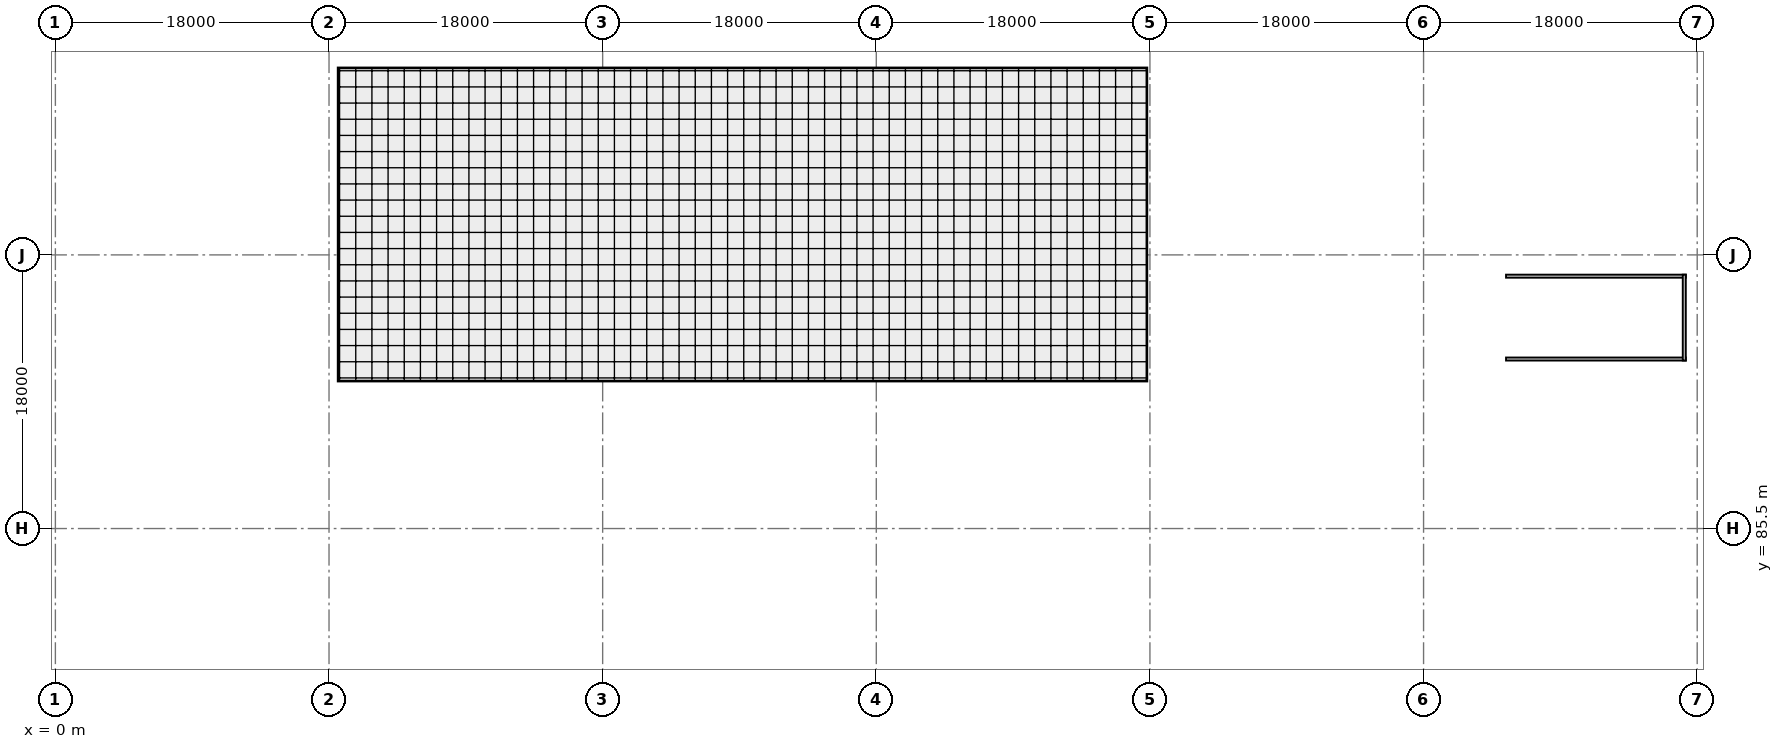
"""IFC4 building model, lengths in metres.
Left out: names, types, materials, properties, quantities, classifications, styles, units other than length and angle.
Written with IfcOpenShell. Run it as: python <this file> out.ifc"""

import sys

from ifc_helpers import new_model, si_unit, direction, frame, frame_2d, origin, origin_2d, place, context, subcontext, project, spatial, rectangle, extrude, element, save


model = new_model("IFC4")
c1 = context("Model", 3, precision=1e-05, world=origin(), true_north=direction((0.0, 1.0)))
c2 = subcontext(c1, "Body", "Model", "MODEL_VIEW")
j1 = project(units=[si_unit("LENGTHUNIT", "METRE"), si_unit("PLANEANGLEUNIT", "RADIAN")], contexts=[c1])
p1 = place(None, origin())
s1 = spatial("IfcSite", under=j1, at=p1, CompositionType="ELEMENT")
p2 = place(p1, origin())
s2 = spatial("IfcBuilding", under=s1, at=p2, CompositionType="ELEMENT")
p3 = place(p2, frame((0.0, 0.0, -5.4)))
s3 = spatial("IfcBuildingStorey", under=s2, at=p3, CompositionType="ELEMENT", Elevation=-5.4)
for number, where, z_axis, x_axis in (
    (1, (0.0, 76.5, 0.0), (0.0, 0.0, 1.0), (1.0, 0.0, 0.0)),
    (2, (0.0, 85.5, 0.0), (0.0, 0.0, 1.0), (1.0, 0.0, 0.0)),
    (3, (0.0, 94.5, 0.0), (0.0, 0.0, 1.0), (1.0, 0.0, 0.0)),
    (4, (0.0, 103.5, 0.0), (0.0, 0.0, 1.0), (1.0, 0.0, 0.0)),
):
    element("IfcColumn", number, at=place(p3, frame(where, z_axis=z_axis, x_axis=x_axis)), inside=s3, PredefinedType="COLUMN", context=c2, shape_type="SweptSolid", body=[
        extrude(rectangle(XDim=1.6, YDim=1.2, at=origin_2d()), origin(), (0.0, 0.0, 1.0), 5.4),
    ])
p4 = place(p3, frame((0.0, 117.0, 0.0), z_axis=(0.0, 0.0, 1.0), x_axis=(1.0, 0.0, 0.0)))
e5 = element("IfcColumn", 5, at=p4, inside=s3, PredefinedType="COLUMN", context=c2, shape_type="SweptSolid", body=[
    extrude(rectangle(XDim=1.0, YDim=0.9, at=origin_2d()), origin(), (0.0, 0.0, 1.0), 5.4),
])
p5 = place(p3, frame((18.0, 103.5, 0.0), z_axis=(0.0, 0.0, 1.0), x_axis=(1.0, 0.0, 0.0)))
e6 = element("IfcColumn", 6, at=p5, inside=s3, PredefinedType="COLUMN", context=c2, shape_type="SweptSolid", body=[
    extrude(rectangle(XDim=1.6, YDim=1.2, at=origin_2d()), origin(), (0.0, 0.0, 1.0), 5.4),
])
p6 = place(p3, frame((18.0, 117.0, 0.0), z_axis=(0.0, 0.0, 1.0), x_axis=(1.0, 0.0, 0.0)))
e7 = element("IfcColumn", 7, at=p6, inside=s3, PredefinedType="COLUMN", context=c2, shape_type="SweptSolid", body=[
    extrude(rectangle(XDim=1.0, YDim=0.9, at=origin_2d()), origin(), (0.0, 0.0, 1.0), 5.4),
])
p7 = place(p3, frame((36.0, 103.5, 0.0), z_axis=(0.0, 0.0, 1.0), x_axis=(1.0, 0.0, 0.0)))
e8 = element("IfcColumn", 8, at=p7, inside=s3, PredefinedType="COLUMN", context=c2, shape_type="SweptSolid", body=[
    extrude(rectangle(XDim=1.6, YDim=1.2, at=origin_2d()), origin(), (0.0, 0.0, 1.0), 5.4),
])
p8 = place(p3, frame((36.0, 117.0, 0.0), z_axis=(0.0, 0.0, 1.0), x_axis=(1.0, 0.0, 0.0)))
e9 = element("IfcColumn", 9, at=p8, inside=s3, PredefinedType="COLUMN", context=c2, shape_type="SweptSolid", body=[
    extrude(rectangle(XDim=1.0, YDim=0.9, at=origin_2d()), origin(), (0.0, 0.0, 1.0), 5.4),
])
p9 = place(p3, frame((54.0, 103.5, 0.0), z_axis=(0.0, 0.0, 1.0), x_axis=(1.0, 0.0, 0.0)))
e10 = element("IfcColumn", 10, at=p9, inside=s3, PredefinedType="COLUMN", context=c2, shape_type="SweptSolid", body=[
    extrude(rectangle(XDim=1.6, YDim=1.2, at=origin_2d()), origin(), (0.0, 0.0, 1.0), 5.4),
])
p10 = place(p3, frame((54.0, 117.0, 0.0), z_axis=(0.0, 0.0, 1.0), x_axis=(1.0, 0.0, 0.0)))
e11 = element("IfcColumn", 11, at=p10, inside=s3, PredefinedType="COLUMN", context=c2, shape_type="SweptSolid", body=[
    extrude(rectangle(XDim=1.0, YDim=0.9, at=origin_2d()), origin(), (0.0, 0.0, 1.0), 5.4),
])
p11 = place(p3, frame((72.0, 103.5, 0.0), z_axis=(0.0, 0.0, 1.0), x_axis=(1.0, 0.0, 0.0)))
e12 = element("IfcColumn", 12, at=p11, inside=s3, PredefinedType="COLUMN", context=c2, shape_type="SweptSolid", body=[
    extrude(rectangle(XDim=1.6, YDim=1.2, at=origin_2d()), origin(), (0.0, 0.0, 1.0), 5.4),
])
p12 = place(p3, frame((72.0, 117.0, 0.0), z_axis=(0.0, 0.0, 1.0), x_axis=(1.0, 0.0, 0.0)))
e13 = element("IfcColumn", 13, at=p12, inside=s3, PredefinedType="COLUMN", context=c2, shape_type="SweptSolid", body=[
    extrude(rectangle(XDim=1.0, YDim=0.9, at=origin_2d()), origin(), (0.0, 0.0, 1.0), 5.4),
])
p13 = place(p3, frame((90.0, 103.5, 0.0), z_axis=(0.0, 0.0, 1.0), x_axis=(1.0, 0.0, 0.0)))
e14 = element("IfcColumn", 14, at=p13, inside=s3, PredefinedType="COLUMN", context=c2, shape_type="SweptSolid", body=[
    extrude(rectangle(XDim=1.6, YDim=1.2, at=origin_2d()), origin(), (0.0, 0.0, 1.0), 5.4),
])
p14 = place(p3, frame((90.0, 117.0, 0.0), z_axis=(0.0, 0.0, 1.0), x_axis=(1.0, 0.0, 0.0)))
e15 = element("IfcColumn", 15, at=p14, inside=s3, PredefinedType="COLUMN", context=c2, shape_type="SweptSolid", body=[
    extrude(rectangle(XDim=1.0, YDim=0.9, at=origin_2d()), origin(), (0.0, 0.0, 1.0), 5.4),
])
p15 = place(p3, frame((108.0, 103.5, 0.0), z_axis=(0.0, 0.0, 1.0), x_axis=(1.0, 0.0, 0.0)))
e16 = element("IfcColumn", 16, at=p15, inside=s3, PredefinedType="COLUMN", context=c2, shape_type="SweptSolid", body=[
    extrude(rectangle(XDim=1.6, YDim=1.2, at=origin_2d()), origin(), (0.0, 0.0, 1.0), 5.4),
])
p16 = place(p3, frame((108.0, 117.0, 0.0), z_axis=(0.0, 0.0, 1.0), x_axis=(1.0, 0.0, 0.0)))
e17 = element("IfcColumn", 17, at=p16, inside=s3, PredefinedType="COLUMN", context=c2, shape_type="SweptSolid", body=[
    extrude(rectangle(XDim=1.0, YDim=0.9, at=origin_2d()), origin(), (0.0, 0.0, 1.0), 5.4),
])
for number, where, z_axis, x_axis in (
    (18, (18.0, 76.5, 0.0), (0.0, 0.0, 1.0), (1.0, 0.0, 0.0)),
    (19, (36.0, 76.5, 0.0), (0.0, 0.0, 1.0), (1.0, 0.0, 0.0)),
    (20, (54.0, 76.5, 0.0), (0.0, 0.0, 1.0), (1.0, 0.0, 0.0)),
    (21, (72.0, 76.5, 0.0), (0.0, 0.0, 1.0), (1.0, 0.0, 0.0)),
    (22, (90.0, 76.5, 0.0), (0.0, 0.0, 1.0), (1.0, 0.0, 0.0)),
    (23, (108.0, 76.5, 0.0), (0.0, 0.0, 1.0), (1.0, 0.0, 0.0)),
    (24, (18.0, 85.5, 0.0), (0.0, 0.0, 1.0), (1.0, 0.0, 0.0)),
    (25, (36.0, 85.5, 0.0), (0.0, 0.0, 1.0), (1.0, 0.0, 0.0)),
    (26, (54.0, 85.5, 0.0), (0.0, 0.0, 1.0), (1.0, 0.0, 0.0)),
    (27, (72.0, 85.5, 0.0), (0.0, 0.0, 1.0), (1.0, 0.0, 0.0)),
    (28, (90.0, 85.5, 0.0), (0.0, 0.0, 1.0), (1.0, 0.0, 0.0)),
    (29, (108.0, 85.5, 0.0), (0.0, 0.0, 1.0), (1.0, 0.0, 0.0)),
    (30, (18.0, 94.5, 0.0), (0.0, 0.0, 1.0), (1.0, 0.0, 0.0)),
    (31, (36.0, 94.5, 0.0), (0.0, 0.0, 1.0), (1.0, 0.0, 0.0)),
    (32, (54.0, 94.5, 0.0), (0.0, 0.0, 1.0), (1.0, 0.0, 0.0)),
    (33, (72.0, 94.5, 0.0), (0.0, 0.0, 1.0), (1.0, 0.0, 0.0)),
    (34, (90.0, 94.5, 0.0), (0.0, 0.0, 1.0), (1.0, 0.0, 0.0)),
    (35, (108.0, 94.5, 0.0), (0.0, 0.0, 1.0), (1.0, 0.0, 0.0)),
):
    element("IfcColumn", number, at=place(p3, frame(where, z_axis=z_axis, x_axis=x_axis)), inside=s3, PredefinedType="COLUMN", context=c2, shape_type="SweptSolid", body=[
        extrude(rectangle(XDim=0.75, YDim=0.75, at=origin_2d()), origin(), (0.0, 0.0, 1.0), 3.5),
    ])
for number, where, z_axis, x_axis in (
    (36, (0.0, 108.5, 0.0), (0.0, 0.0, 1.0), (1.0, 0.0, 0.0)),
    (37, (18.0, 108.5, 0.0), (0.0, 0.0, 1.0), (1.0, 0.0, 0.0)),
    (38, (36.0, 108.5, 0.0), (0.0, 0.0, 1.0), (1.0, 0.0, 0.0)),
    (39, (54.0, 108.5, 0.0), (0.0, 0.0, 1.0), (1.0, 0.0, 0.0)),
    (40, (72.0, 108.5, 0.0), (0.0, 0.0, 1.0), (1.0, 0.0, 0.0)),
    (41, (90.0, 108.5, 0.0), (0.0, 0.0, 1.0), (1.0, 0.0, 0.0)),
    (42, (108.0, 108.5, 0.0), (0.0, 0.0, 1.0), (1.0, 0.0, 0.0)),
):
    element("IfcColumn", number, at=place(p3, frame(where, z_axis=z_axis, x_axis=x_axis)), inside=s3, PredefinedType="COLUMN", context=c2, shape_type="SweptSolid", body=[
        extrude(rectangle(XDim=0.75, YDim=0.75, at=origin_2d()), origin(), (0.0, 0.0, 1.0), 5.02),
    ])
for number, where, z_axis, x_axis in (
    (43, (23.425, 96.65, 0.0), (0.0, 0.0, 1.0), (1.0, 0.0, 0.0)),
    (44, (35.25, 102.1, 0.0), (0.0, 0.0, 1.0), (-1.0, 0.0, 0.0)),
):
    element("IfcWall", number, at=place(p3, frame(where, z_axis=z_axis, x_axis=x_axis)), inside=s3, PredefinedType="SOLIDWALL", context=c2, shape_type="SweptSolid", body=[
        extrude(rectangle(XDim=11.825, YDim=0.2, at=frame_2d((5.913, 0.0))), origin(), (0.0, 0.0, 1.0), 5.02),
    ])
p17 = place(p3, frame((35.15, 96.55, 0.0), z_axis=(0.0, 0.0, 1.0), x_axis=(0.0, 1.0, 0.0)))
e45 = element("IfcWall", 45, at=p17, inside=s3, PredefinedType="SOLIDWALL", context=c2, shape_type="SweptSolid", body=[
    extrude(rectangle(XDim=5.65, YDim=0.2, at=frame_2d((2.825, 0.0))), origin(), (0.0, 0.0, 1.0), 5.02),
])
for number, where, z_axis, x_axis in (
    (46, (59.425, 96.65, 0.0), (0.0, 0.0, 1.0), (1.0, 0.0, 0.0)),
    (47, (71.25, 102.1, 0.0), (0.0, 0.0, 1.0), (-1.0, 0.0, 0.0)),
):
    element("IfcWall", number, at=place(p3, frame(where, z_axis=z_axis, x_axis=x_axis)), inside=s3, PredefinedType="SOLIDWALL", context=c2, shape_type="SweptSolid", body=[
        extrude(rectangle(XDim=11.825, YDim=0.2, at=frame_2d((5.913, 0.0))), origin(), (0.0, 0.0, 1.0), 5.02),
    ])
p18 = place(p3, frame((71.15, 96.55, 0.0), z_axis=(0.0, 0.0, 1.0), x_axis=(0.0, 1.0, 0.0)))
e48 = element("IfcWall", 48, at=p18, inside=s3, PredefinedType="SOLIDWALL", context=c2, shape_type="SweptSolid", body=[
    extrude(rectangle(XDim=5.65, YDim=0.2, at=frame_2d((2.825, 0.0))), origin(), (0.0, 0.0, 1.0), 5.02),
])
for number, where, z_axis, x_axis in (
    (49, (95.425, 96.65, 0.0), (0.0, 0.0, 1.0), (1.0, 0.0, 0.0)),
    (50, (107.25, 102.1, 0.0), (0.0, 0.0, 1.0), (-1.0, 0.0, 0.0)),
):
    element("IfcWall", number, at=place(p3, frame(where, z_axis=z_axis, x_axis=x_axis)), inside=s3, PredefinedType="SOLIDWALL", context=c2, shape_type="SweptSolid", body=[
        extrude(rectangle(XDim=11.825, YDim=0.2, at=frame_2d((5.913, 0.0))), origin(), (0.0, 0.0, 1.0), 5.02),
    ])
p19 = place(p3, frame((107.15, 96.55, 0.0), z_axis=(0.0, 0.0, 1.0), x_axis=(0.0, 1.0, 0.0)))
e51 = element("IfcWall", 51, at=p19, inside=s3, PredefinedType="SOLIDWALL", context=c2, shape_type="SweptSolid", body=[
    extrude(rectangle(XDim=5.65, YDim=0.2, at=frame_2d((2.825, 0.0))), origin(), (0.0, 0.0, 1.0), 5.02),
])
for number, where, z_axis, x_axis in (
    (52, (23.425, 110.15, 0.0), (0.0, 0.0, 1.0), (1.0, 0.0, 0.0)),
    (53, (35.25, 115.6, 0.0), (0.0, 0.0, 1.0), (-1.0, 0.0, 0.0)),
):
    element("IfcWall", number, at=place(p3, frame(where, z_axis=z_axis, x_axis=x_axis)), inside=s3, PredefinedType="SOLIDWALL", context=c2, shape_type="SweptSolid", body=[
        extrude(rectangle(XDim=11.825, YDim=0.2, at=frame_2d((5.913, 0.0))), origin(), (0.0, 0.0, 1.0), 5.02),
    ])
p20 = place(p3, frame((35.15, 110.05, 0.0), z_axis=(0.0, 0.0, 1.0), x_axis=(0.0, 1.0, 0.0)))
e54 = element("IfcWall", 54, at=p20, inside=s3, PredefinedType="SOLIDWALL", context=c2, shape_type="SweptSolid", body=[
    extrude(rectangle(XDim=5.65, YDim=0.2, at=frame_2d((2.825, 0.0))), origin(), (0.0, 0.0, 1.0), 5.02),
])
for number, where, z_axis, x_axis in (
    (55, (59.425, 110.15, 0.0), (0.0, 0.0, 1.0), (1.0, 0.0, 0.0)),
    (56, (71.25, 115.6, 0.0), (0.0, 0.0, 1.0), (-1.0, 0.0, 0.0)),
):
    element("IfcWall", number, at=place(p3, frame(where, z_axis=z_axis, x_axis=x_axis)), inside=s3, PredefinedType="SOLIDWALL", context=c2, shape_type="SweptSolid", body=[
        extrude(rectangle(XDim=11.825, YDim=0.2, at=frame_2d((5.913, 0.0))), origin(), (0.0, 0.0, 1.0), 5.02),
    ])
p21 = place(p3, frame((71.15, 110.05, 0.0), z_axis=(0.0, 0.0, 1.0), x_axis=(0.0, 1.0, 0.0)))
e57 = element("IfcWall", 57, at=p21, inside=s3, PredefinedType="SOLIDWALL", context=c2, shape_type="SweptSolid", body=[
    extrude(rectangle(XDim=5.65, YDim=0.2, at=frame_2d((2.825, 0.0))), origin(), (0.0, 0.0, 1.0), 5.02),
])
save(model, sys.argv[1])
